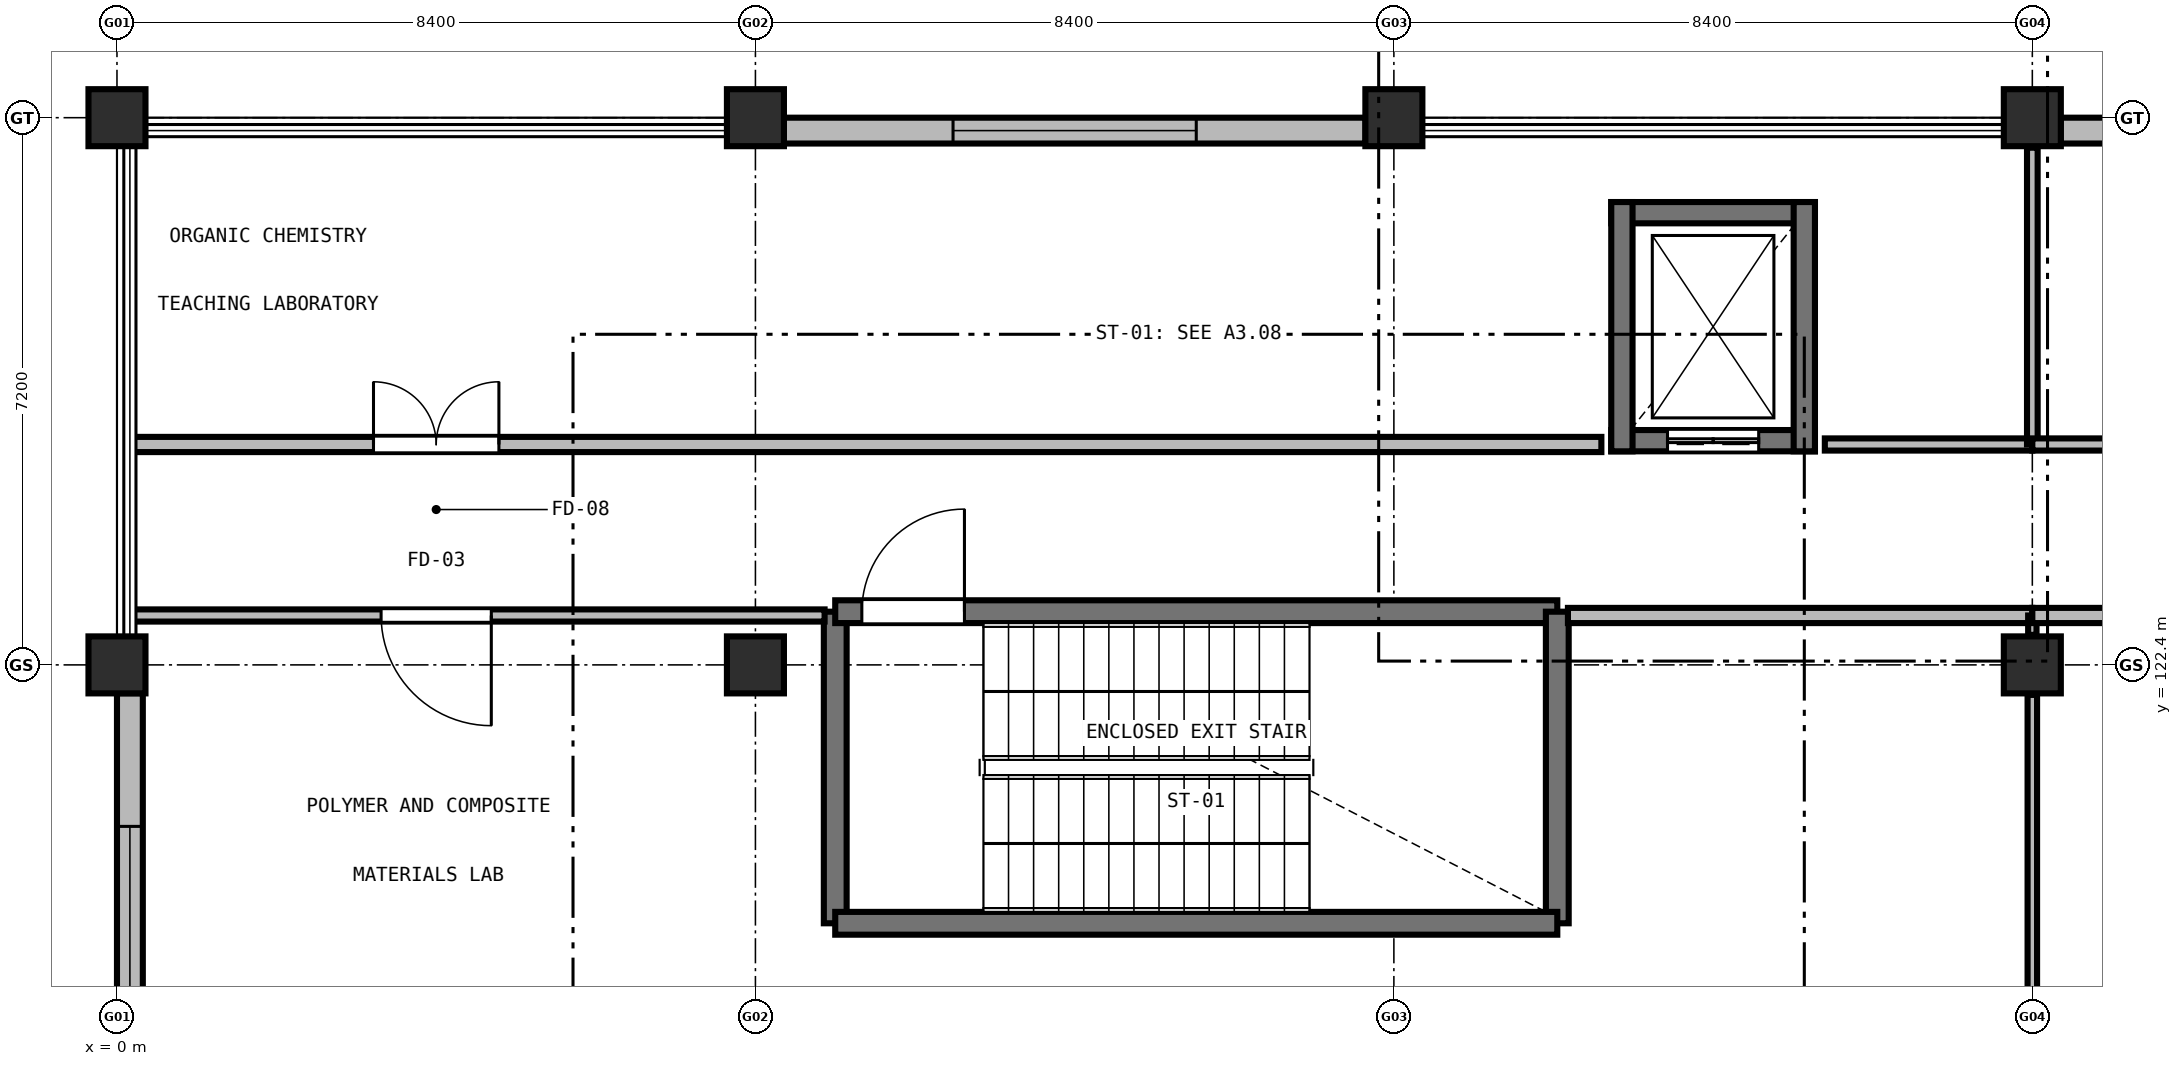
"""IFC4 building model, lengths in metres.
Left out: names, types, materials, properties, quantities, classifications, styles, units other than length and angle.
Written with IfcOpenShell. Run it as: python <this file> out.ifc"""

import sys

from ifc_helpers import new_model, si_unit, direction, frame, frame_2d, origin, origin_2d, place, context, subcontext, project, spatial, rectangle, extrude, element, fill, save


model = new_model("IFC4")
c1 = context("Model", 3, precision=1e-05, world=origin(), true_north=direction((0.0, 1.0)))
c2 = subcontext(c1, "Body", "Model", "MODEL_VIEW")
j1 = project(units=[si_unit("LENGTHUNIT", "METRE"), si_unit("PLANEANGLEUNIT", "RADIAN")], contexts=[c1])
p1 = place(None, origin())
s1 = spatial("IfcSite", under=j1, at=p1, CompositionType="ELEMENT")
p2 = place(p1, origin())
s2 = spatial("IfcBuilding", under=s1, at=p2, CompositionType="ELEMENT")
p3 = place(p2, frame((0.0, 0.0, 5.1)))
s3 = spatial("IfcBuildingStorey", under=s2, at=p3, CompositionType="ELEMENT", Elevation=5.1)
for number, where, z_axis, x_axis in (
    (1, (0.0, 122.4, 0.0), (0.0, 0.0, 1.0), (1.0, 0.0, 0.0)),
    (2, (0.0, 129.6, 0.0), (0.0, 0.0, 1.0), (1.0, 0.0, 0.0)),
    (3, (8.4, 122.4, 0.0), (0.0, 0.0, 1.0), (1.0, 0.0, 0.0)),
    (4, (8.4, 129.6, 0.0), (0.0, 0.0, 1.0), (1.0, 0.0, 0.0)),
    (5, (16.8, 129.6, 0.0), (0.0, 0.0, 1.0), (1.0, 0.0, 0.0)),
    (6, (25.2, 122.4, 0.0), (0.0, 0.0, 1.0), (1.0, 0.0, 0.0)),
    (7, (25.2, 129.6, 0.0), (0.0, 0.0, 1.0), (1.0, 0.0, 0.0)),
):
    element("IfcColumn", number, at=place(p3, frame(where, z_axis=z_axis, x_axis=x_axis)), inside=s3, PredefinedType="COLUMN", context=c2, shape_type="SweptSolid", body=[
        extrude(rectangle(XDim=0.75, YDim=0.75, at=origin_2d()), origin(), (0.0, 0.0, 1.0), 4.2),
    ])
p4 = place(p3, frame((0.17, 115.523, 0.0), z_axis=(0.0, 0.0, 1.0), x_axis=(0.0, 1.0, 0.0)))
e8 = element("IfcWall", 8, at=p4, inside=s3, PredefinedType="SOLIDWALL", context=c2, shape_type="SweptSolid", body=[
    extrude(rectangle(XDim=6.504, YDim=0.34, at=frame_2d((3.252, 0.0))), origin(), (0.0, 0.0, 1.0), 3.31),
])
p5 = place(p4, frame((1.752, 0.0, 0.95)))
e9 = element("IfcOpeningElement", 9, at=p5, cuts=e8, PredefinedType="OPENING", context=c2, shape_type="SweptSolid", body=[
    extrude(rectangle(XDim=3.0, YDim=2.1, at=frame_2d((1.5, 1.05))), frame((0.0, 0.18, 0.0), z_axis=(0.0, -1.0, 0.0), x_axis=(1.0, 0.0, 0.0)), (0.0, 0.0, 1.0), 0.36),
])
p6 = place(p3, frame((8.773, 129.43, 0.0), z_axis=(0.0, 0.0, 1.0), x_axis=(1.0, 0.0, 0.0)))
e10 = element("IfcWall", 10, at=p6, inside=s3, PredefinedType="SOLIDWALL", context=c2, shape_type="SweptSolid", body=[
    extrude(rectangle(XDim=7.654, YDim=0.34, at=frame_2d((3.827, 0.0))), origin(), (0.0, 0.0, 1.0), 3.11),
])
p7 = place(p6, frame((2.227, 0.0, 0.95)))
e11 = element("IfcOpeningElement", 11, at=p7, cuts=e10, PredefinedType="OPENING", context=c2, shape_type="SweptSolid", body=[
    extrude(rectangle(XDim=3.2, YDim=1.91, at=frame_2d((1.6, 0.955))), frame((0.0, 0.18, 0.0), z_axis=(0.0, -1.0, 0.0), x_axis=(1.0, 0.0, 0.0)), (0.0, 0.0, 1.0), 0.36),
])
p8 = place(p3, frame((25.573, 129.43, 0.0), z_axis=(0.0, 0.0, 1.0), x_axis=(1.0, 0.0, 0.0)))
e12 = element("IfcWall", 12, at=p8, inside=s3, PredefinedType="SOLIDWALL", context=c2, shape_type="SweptSolid", body=[
    extrude(rectangle(XDim=7.654, YDim=0.34, at=frame_2d((3.827, 0.0))), origin(), (0.0, 0.0, 1.0), 3.11),
])
p9 = place(p8, frame((2.427, 0.0, 0.95)))
e13 = element("IfcOpeningElement", 13, at=p9, cuts=e12, PredefinedType="OPENING", context=c2, shape_type="SweptSolid", body=[
    extrude(rectangle(XDim=2.8, YDim=1.91, at=frame_2d((1.4, 0.955))), frame((0.0, 0.18, 0.0), z_axis=(0.0, -1.0, 0.0), x_axis=(1.0, 0.0, 0.0)), (0.0, 0.0, 1.0), 0.36),
])
p10 = place(p3, frame((9.45, 119.0, 0.0), z_axis=(0.0, 0.0, 1.0), x_axis=(0.0, 1.0, 0.0)))
e14 = element("IfcWall", 14, at=p10, inside=s3, PredefinedType="SHEAR", context=c2, shape_type="SweptSolid", body=[
    extrude(rectangle(XDim=4.1, YDim=0.3, at=frame_2d((2.05, 0.0))), origin(), (0.0, 0.0, 1.0), 3.92),
])
p11 = place(p3, frame((9.45, 123.1, 0.0), z_axis=(0.0, 0.0, 1.0), x_axis=(1.0, 0.0, 0.0)))
e15 = element("IfcWall", 15, at=p11, inside=s3, PredefinedType="SHEAR", context=c2, shape_type="SweptSolid", body=[
    extrude(rectangle(XDim=9.5, YDim=0.3, at=frame_2d((4.75, 0.0))), origin(), (0.0, 0.0, 1.0), 3.92),
])
p12 = place(p11, frame((0.35, 0.0, 0.0)))
e16 = element("IfcOpeningElement", 16, at=p12, cuts=e15, PredefinedType="OPENING", context=c2, shape_type="SweptSolid", body=[
    extrude(rectangle(XDim=1.35, YDim=2.2, at=frame_2d((0.675, 1.1))), frame((0.0, 0.16, 0.0), z_axis=(0.0, -1.0, 0.0), x_axis=(1.0, 0.0, 0.0)), (0.0, 0.0, 1.0), 0.32),
])
p13 = place(p3, frame((18.95, 123.1, 0.0), z_axis=(0.0, 0.0, 1.0), x_axis=(0.0, -1.0, 0.0)))
e17 = element("IfcWall", 17, at=p13, inside=s3, PredefinedType="SHEAR", context=c2, shape_type="SweptSolid", body=[
    extrude(rectangle(XDim=4.1, YDim=0.3, at=frame_2d((2.05, 0.0))), origin(), (0.0, 0.0, 1.0), 3.92),
])
p14 = place(p3, frame((18.95, 119.0, 0.0), z_axis=(0.0, 0.0, 1.0), x_axis=(-1.0, 0.0, 0.0)))
e18 = element("IfcWall", 18, at=p14, inside=s3, PredefinedType="SHEAR", context=c2, shape_type="SweptSolid", body=[
    extrude(rectangle(XDim=9.5, YDim=0.3, at=frame_2d((4.75, 0.0))), origin(), (0.0, 0.0, 1.0), 3.92),
])
p15 = place(p3, frame((22.34, 125.35, 0.0), z_axis=(0.0, 0.0, 1.0), x_axis=(-1.0, 0.0, 0.0)))
e19 = element("IfcWall", 19, at=p15, inside=s3, PredefinedType="SHEAR", context=c2, shape_type="SweptSolid", body=[
    extrude(rectangle(XDim=2.68, YDim=0.28, at=frame_2d((1.34, 0.0))), origin(), (0.0, 0.0, 1.0), 3.92),
])
p16 = place(p15, frame((0.74, 0.0, 0.0)))
e20 = element("IfcOpeningElement", 20, at=p16, cuts=e19, PredefinedType="OPENING", context=c2, shape_type="SweptSolid", body=[
    extrude(rectangle(XDim=1.2, YDim=2.15, at=frame_2d((0.6, 1.075))), frame((0.0, 0.15, 0.0), z_axis=(0.0, -1.0, 0.0), x_axis=(1.0, 0.0, 0.0)), (0.0, 0.0, 1.0), 0.3),
])
p17 = place(p3, frame((19.66, 128.35, 0.0), z_axis=(0.0, 0.0, 1.0), x_axis=(1.0, 0.0, 0.0)))
e21 = element("IfcWall", 21, at=p17, inside=s3, PredefinedType="SHEAR", context=c2, shape_type="SweptSolid", body=[
    extrude(rectangle(XDim=2.68, YDim=0.28, at=frame_2d((1.34, 0.0))), origin(), (0.0, 0.0, 1.0), 3.92),
])
for number, where, z_axis, x_axis in (
    (22, (19.8, 125.21, 0.0), (0.0, 0.0, 1.0), (0.0, 1.0, 0.0)),
    (23, (22.2, 128.49, 0.0), (0.0, 0.0, 1.0), (0.0, -1.0, 0.0)),
):
    element("IfcWall", number, at=place(p3, frame(where, z_axis=z_axis, x_axis=x_axis)), inside=s3, PredefinedType="SHEAR", context=c2, shape_type="SweptSolid", body=[
        extrude(rectangle(XDim=3.28, YDim=0.28, at=frame_2d((1.64, 0.0))), origin(), (0.0, 0.0, 1.0), 3.92),
    ])
p18 = place(p3, frame((0.22, 125.3, 0.0), z_axis=(0.0, 0.0, 1.0), x_axis=(1.0, 0.0, 0.0)))
e24 = element("IfcWall", 24, at=p18, inside=s3, PredefinedType="SOLIDWALL", context=c2, shape_type="SweptSolid", body=[
    extrude(rectangle(XDim=19.31, YDim=0.2, at=frame_2d((9.655, 0.0))), origin(), (0.0, 0.0, 1.0), 3.305),
])
p19 = place(p18, frame((3.155, 0.0, 0.0)))
e25 = element("IfcOpeningElement", 25, at=p19, cuts=e24, PredefinedType="OPENING", context=c2, shape_type="SweptSolid", body=[
    extrude(rectangle(XDim=1.65, YDim=2.2, at=frame_2d((0.825, 1.1))), frame((0.0, 0.11, 0.0), z_axis=(0.0, -1.0, 0.0), x_axis=(1.0, 0.0, 0.0)), (0.0, 0.0, 1.0), 0.22),
])
p20 = place(p3, frame((22.47, 125.3, 0.0), z_axis=(0.0, 0.0, 1.0), x_axis=(1.0, 0.0, 0.0)))
e26 = element("IfcWall", 26, at=p20, inside=s3, PredefinedType="PARTITIONING", context=c2, shape_type="SweptSolid", body=[
    extrude(rectangle(XDim=2.73, YDim=0.16, at=frame_2d((1.365, 0.0))), origin(), (0.0, 0.0, 1.0), 3.305),
])
p21 = place(p3, frame((25.2, 125.3, 0.0), z_axis=(0.0, 0.0, 1.0), x_axis=(0.0, 1.0, 0.0)))
e27 = element("IfcWall", 27, at=p21, inside=s3, PredefinedType="PARTITIONING", context=c2, shape_type="SweptSolid", body=[
    extrude(rectangle(XDim=3.905, YDim=0.14, at=frame_2d((1.953, 0.0))), origin(), (0.0, 0.0, 1.0), 3.105),
])
p22 = place(p3, frame((25.2, 125.3, 0.0), z_axis=(0.0, 0.0, 1.0), x_axis=(1.0, 0.0, 0.0)))
e28 = element("IfcWall", 28, at=p22, inside=s3, PredefinedType="PARTITIONING", context=c2, shape_type="SweptSolid", body=[
    extrude(rectangle(XDim=25.2, YDim=0.16, at=frame_2d((12.6, 0.0))), origin(), (0.0, 0.0, 1.0), 3.305),
])
p23 = place(p22, frame((3.55, 0.0, 0.0)))
e29 = element("IfcOpeningElement", 29, at=p23, cuts=e28, PredefinedType="OPENING", context=c2, shape_type="SweptSolid", body=[
    extrude(rectangle(XDim=1.3, YDim=2.15, at=frame_2d((0.65, 1.075))), frame((0.0, 0.09, 0.0), z_axis=(0.0, -1.0, 0.0), x_axis=(1.0, 0.0, 0.0)), (0.0, 0.0, 1.0), 0.18),
])
p24 = place(p3, frame((25.2, 123.05, 0.0), z_axis=(0.0, 0.0, 1.0), x_axis=(-1.0, 0.0, 0.0)))
e30 = element("IfcWall", 30, at=p24, inside=s3, PredefinedType="SOLIDWALL", context=c2, shape_type="SweptSolid", body=[
    extrude(rectangle(XDim=6.11, YDim=0.2, at=frame_2d((3.055, 0.0))), origin(), (0.0, 0.0, 1.0), 3.305),
])
p25 = place(p3, frame((9.31, 123.05, 0.0), z_axis=(0.0, 0.0, 1.0), x_axis=(-1.0, 0.0, 0.0)))
e31 = element("IfcWall", 31, at=p25, inside=s3, PredefinedType="PARTITIONING", context=c2, shape_type="SweptSolid", body=[
    extrude(rectangle(XDim=9.09, YDim=0.16, at=frame_2d((4.545, 0.0))), origin(), (0.0, 0.0, 1.0), 3.305),
])
p26 = place(p25, frame((4.385, 0.0, 0.0)))
e32 = element("IfcOpeningElement", 32, at=p26, cuts=e31, PredefinedType="OPENING", context=c2, shape_type="SweptSolid", body=[
    extrude(rectangle(XDim=1.45, YDim=2.2, at=frame_2d((0.725, 1.1))), frame((0.0, 0.09, 0.0), z_axis=(0.0, -1.0, 0.0), x_axis=(1.0, 0.0, 0.0)), (0.0, 0.0, 1.0), 0.18),
])
p27 = place(p3, frame((25.2, 115.545, 0.0), z_axis=(0.0, 0.0, 1.0), x_axis=(0.0, 1.0, 0.0)))
e33 = element("IfcWall", 33, at=p27, inside=s3, PredefinedType="PARTITIONING", context=c2, shape_type="SweptSolid", body=[
    extrude(rectangle(XDim=6.46, YDim=0.125, at=frame_2d((3.23, 0.0))), origin(), (0.0, 0.0, 1.0), 3.105),
])
p28 = place(p3, frame((25.2, 122.795, 0.0), z_axis=(0.0, 0.0, 1.0), x_axis=(0.0, 1.0, 0.0)))
e34 = element("IfcWall", 34, at=p28, inside=s3, PredefinedType="PARTITIONING", context=c2, shape_type="SweptSolid", body=[
    extrude(rectangle(XDim=0.255, YDim=0.11, at=frame_2d((0.127, 0.0))), origin(), (0.0, 0.0, 1.0), 3.155),
])
p29 = place(p3, frame((33.6, 123.05, 0.0), z_axis=(0.0, 0.0, 1.0), x_axis=(-1.0, 0.0, 0.0)))
e35 = element("IfcWall", 35, at=p29, inside=s3, PredefinedType="SOLIDWALL", context=c2, shape_type="SweptSolid", body=[
    extrude(rectangle(XDim=8.4, YDim=0.2, at=frame_2d((4.2, 0.0))), origin(), (0.0, 0.0, 1.0), 3.305),
])
p30 = place(p29, frame((3.425, 0.0, 0.0)))
e36 = element("IfcOpeningElement", 36, at=p30, cuts=e35, PredefinedType="OPENING", context=c2, shape_type="SweptSolid", body=[
    extrude(rectangle(XDim=1.55, YDim=2.2, at=frame_2d((0.775, 1.1))), frame((0.0, 0.11, 0.0), z_axis=(0.0, -1.0, 0.0), x_axis=(1.0, 0.0, 0.0)), (0.0, 0.0, 1.0), 0.22),
])
p31 = place(p5, origin())
e37 = element("IfcWindow", 37, at=p31, inside=s3, PartitioningType="SINGLE_PANEL", PredefinedType="WINDOW", context=c2, shape_type="SweptSolid", body=[
    extrude(rectangle(XDim=3.0, YDim=2.1, at=frame_2d((1.5, 1.05))), frame((0.0, 0.03, 0.0), z_axis=(0.0, -1.0, 0.0), x_axis=(1.0, 0.0, 0.0)), (0.0, 0.0, 1.0), 0.06),
])
fill(e9, e37)
p32 = place(p7, origin())
e38 = element("IfcWindow", 38, at=p32, inside=s3, PartitioningType="SINGLE_PANEL", PredefinedType="WINDOW", context=c2, shape_type="SweptSolid", body=[
    extrude(rectangle(XDim=3.2, YDim=1.91, at=frame_2d((1.6, 0.955))), frame((0.0, 0.03, 0.0), z_axis=(0.0, -1.0, 0.0), x_axis=(1.0, 0.0, 0.0)), (0.0, 0.0, 1.0), 0.06),
])
fill(e11, e38)
p33 = place(p12, origin())
e39 = element("IfcDoor", 39, at=p33, inside=s3, OperationType="SINGLE_SWING_RIGHT", PredefinedType="DOOR", context=c2, shape_type="SweptSolid", body=[
    extrude(rectangle(XDim=1.35, YDim=2.2, at=frame_2d((0.675, 1.1))), frame((0.0, 0.025, 0.0), z_axis=(0.0, -1.0, 0.0), x_axis=(1.0, 0.0, 0.0)), (0.0, 0.0, 1.0), 0.05),
])
fill(e16, e39)
p34 = place(p16, origin())
e40 = element("IfcDoor", 40, at=p34, inside=s3, OperationType="DOUBLE_DOOR_SLIDING", PredefinedType="DOOR", context=c2, shape_type="SweptSolid", body=[
    extrude(rectangle(XDim=1.2, YDim=2.15, at=frame_2d((0.6, 1.075))), frame((0.0, 0.025, 0.0), z_axis=(0.0, -1.0, 0.0), x_axis=(1.0, 0.0, 0.0)), (0.0, 0.0, 1.0), 0.05),
])
fill(e20, e40)
p35 = place(p19, origin())
e41 = element("IfcDoor", 41, at=p35, inside=s3, OperationType="DOUBLE_DOOR_SINGLE_SWING", PredefinedType="DOOR", context=c2, shape_type="SweptSolid", body=[
    extrude(rectangle(XDim=1.65, YDim=2.2, at=frame_2d((0.825, 1.1))), frame((0.0, 0.025, 0.0), z_axis=(0.0, -1.0, 0.0), x_axis=(1.0, 0.0, 0.0)), (0.0, 0.0, 1.0), 0.05),
])
fill(e25, e41)
p36 = place(p26, origin())
e42 = element("IfcDoor", 42, at=p36, inside=s3, OperationType="SINGLE_SWING_LEFT", PredefinedType="DOOR", context=c2, shape_type="SweptSolid", body=[
    extrude(rectangle(XDim=1.45, YDim=2.2, at=frame_2d((0.725, 1.1))), frame((0.0, 0.025, 0.0), z_axis=(0.0, -1.0, 0.0), x_axis=(1.0, 0.0, 0.0)), (0.0, 0.0, 1.0), 0.05),
])
fill(e32, e42)
save(model, sys.argv[1])
